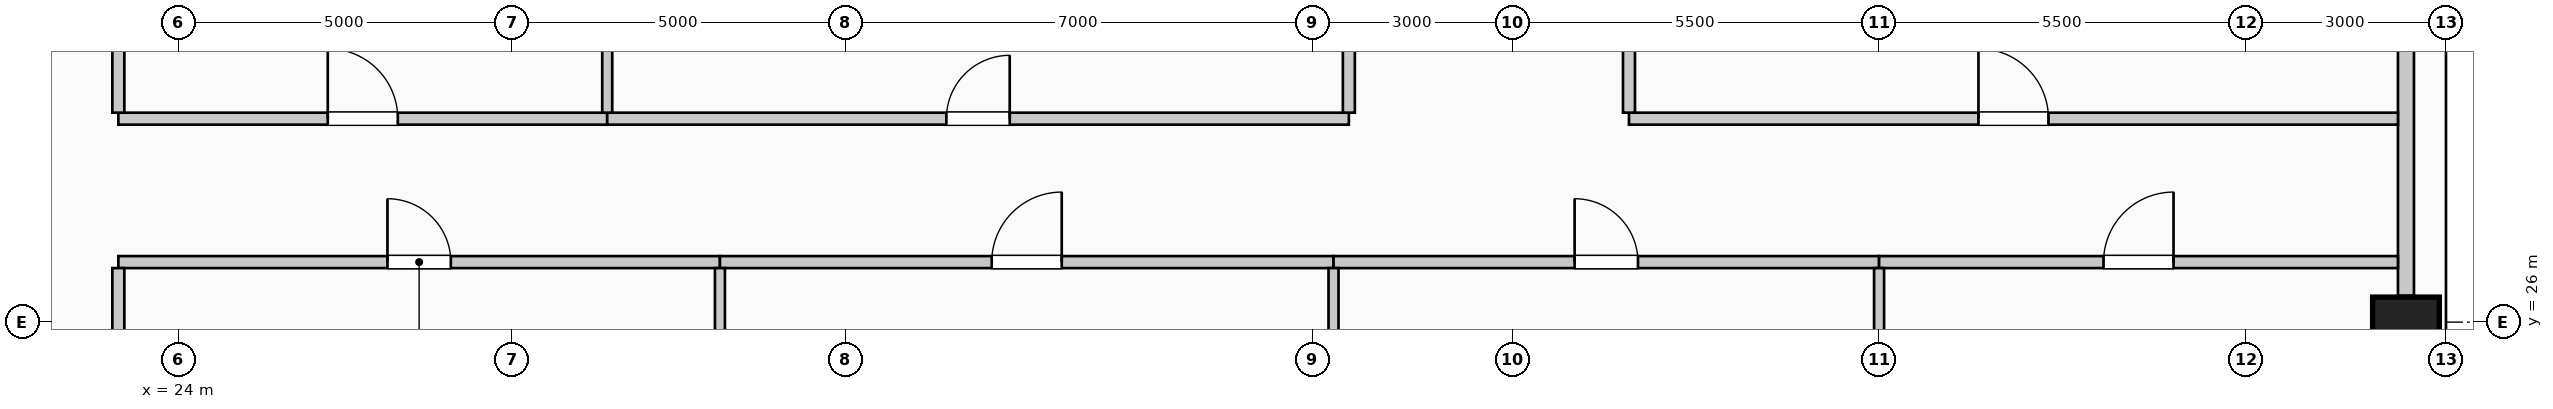
"""IFC4 building model, lengths in metres.
Left out: names, types, materials, properties, quantities, classifications, styles, units other than length and angle.
Written with IfcOpenShell. Run it as: python <this file> out.ifc"""

import sys

from ifc_helpers import new_model, si_unit, direction, frame, frame_2d, origin, origin_2d, place, context, subcontext, project, spatial, rectangle, extrude, element, fill, save


model = new_model("IFC4")
c1 = context("Model", 3, precision=1e-05, world=origin(), true_north=direction((0.0, 1.0)))
c2 = subcontext(c1, "Body", "Model", "MODEL_VIEW")
j1 = project(units=[si_unit("LENGTHUNIT", "METRE"), si_unit("PLANEANGLEUNIT", "RADIAN")], contexts=[c1])
p1 = place(None, origin())
s1 = spatial("IfcSite", under=j1, at=p1, CompositionType="ELEMENT")
p2 = place(p1, origin())
s2 = spatial("IfcBuilding", under=s1, at=p2, CompositionType="ELEMENT")
p3 = place(p2, frame((0.0, 0.0, 248.6)))
s3 = spatial("IfcBuildingStorey", under=s2, at=p3, CompositionType="ELEMENT", Elevation=248.6)
p4 = place(p3, frame((57.4, 26.0, 0.0), z_axis=(0.0, 0.0, 1.0), x_axis=(0.0, 1.0, 0.0)))
e1 = element("IfcColumn", 1, at=p4, inside=s3, PredefinedType="COLUMN", context=c2, shape_type="SweptSolid", body=[
    extrude(rectangle(XDim=0.75, YDim=1.0, at=origin_2d()), origin(), (0.0, 0.0, 1.0), 4.0),
])
p5 = place(p3, frame((57.4, 33.605, 0.0), z_axis=(0.0, 0.0, 1.0), x_axis=(0.0, -1.0, 0.0)))
e2 = element("IfcWall", 2, at=p5, inside=s3, PredefinedType="SOLIDWALL", context=c2, shape_type="SweptSolid", body=[
    extrude(rectangle(XDim=7.21, YDim=0.24, at=frame_2d((3.605, 0.0))), origin(), (0.0, 0.0, 1.0), 3.0),
])
p6 = place(p3, frame((23.1, 26.9, 0.0), z_axis=(0.0, 0.0, 1.0), x_axis=(1.0, 0.0, 0.0)))
e3 = element("IfcWall", 3, at=p6, inside=s3, PredefinedType="PARTITIONING", context=c2, shape_type="SweptSolid", body=[
    extrude(rectangle(XDim=9.02, YDim=0.18, at=frame_2d((4.51, 0.0))), origin(), (0.0, 0.0, 1.0), 3.75),
])
p7 = place(p6, frame((4.035, 0.0, 0.0)))
e4 = element("IfcOpeningElement", 4, at=p7, cuts=e3, PredefinedType="OPENING", context=c2, shape_type="SweptSolid", body=[
    extrude(rectangle(XDim=0.95, YDim=2.15, at=frame_2d((0.475, 1.075))), frame((0.0, 0.1, 0.0), z_axis=(0.0, -1.0, 0.0), x_axis=(1.0, 0.0, 0.0)), (0.0, 0.0, 1.0), 0.2),
])
p8 = place(p3, frame((32.12, 26.9, 0.0), z_axis=(0.0, 0.0, 1.0), x_axis=(1.0, 0.0, 0.0)))
e5 = element("IfcWall", 5, at=p8, inside=s3, PredefinedType="PARTITIONING", context=c2, shape_type="SweptSolid", body=[
    extrude(rectangle(XDim=9.2, YDim=0.18, at=frame_2d((4.6, 0.0))), origin(), (0.0, 0.0, 1.0), 3.75),
])
p9 = place(p8, frame((4.075, 0.0, 0.0)))
e6 = element("IfcOpeningElement", 6, at=p9, cuts=e5, PredefinedType="OPENING", context=c2, shape_type="SweptSolid", body=[
    extrude(rectangle(XDim=1.05, YDim=2.15, at=frame_2d((0.525, 1.075))), frame((0.0, 0.1, 0.0), z_axis=(0.0, -1.0, 0.0), x_axis=(1.0, 0.0, 0.0)), (0.0, 0.0, 1.0), 0.2),
])
p10 = place(p3, frame((41.32, 26.9, 0.0), z_axis=(0.0, 0.0, 1.0), x_axis=(1.0, 0.0, 0.0)))
e7 = element("IfcWall", 7, at=p10, inside=s3, PredefinedType="PARTITIONING", context=c2, shape_type="SweptSolid", body=[
    extrude(rectangle(XDim=8.18, YDim=0.18, at=frame_2d((4.09, 0.0))), origin(), (0.0, 0.0, 1.0), 3.75),
])
p11 = place(p10, frame((3.615, 0.0, 0.0)))
e8 = element("IfcOpeningElement", 8, at=p11, cuts=e7, PredefinedType="OPENING", context=c2, shape_type="SweptSolid", body=[
    extrude(rectangle(XDim=0.95, YDim=2.15, at=frame_2d((0.475, 1.075))), frame((0.0, 0.1, 0.0), z_axis=(0.0, -1.0, 0.0), x_axis=(1.0, 0.0, 0.0)), (0.0, 0.0, 1.0), 0.2),
])
p12 = place(p3, frame((49.5, 26.9, 0.0), z_axis=(0.0, 0.0, 1.0), x_axis=(1.0, 0.0, 0.0)))
e9 = element("IfcWall", 9, at=p12, inside=s3, PredefinedType="PARTITIONING", context=c2, shape_type="SweptSolid", body=[
    extrude(rectangle(XDim=7.78, YDim=0.18, at=frame_2d((3.89, 0.0))), origin(), (0.0, 0.0, 1.0), 3.75),
])
p13 = place(p12, frame((3.365, 0.0, 0.0)))
e10 = element("IfcOpeningElement", 10, at=p13, cuts=e9, PredefinedType="OPENING", context=c2, shape_type="SweptSolid", body=[
    extrude(rectangle(XDim=1.05, YDim=2.15, at=frame_2d((0.525, 1.075))), frame((0.0, 0.1, 0.0), z_axis=(0.0, -1.0, 0.0), x_axis=(1.0, 0.0, 0.0)), (0.0, 0.0, 1.0), 0.2),
])
p14 = place(p3, frame((23.1, 29.05, 0.0), z_axis=(0.0, 0.0, 1.0), x_axis=(1.0, 0.0, 0.0)))
e11 = element("IfcWall", 11, at=p14, inside=s3, PredefinedType="PARTITIONING", context=c2, shape_type="SweptSolid", body=[
    extrude(rectangle(XDim=7.33, YDim=0.18, at=frame_2d((3.665, 0.0))), origin(), (0.0, 0.0, 1.0), 3.75),
])
p15 = place(p14, frame((3.14, 0.0, 0.0)))
e12 = element("IfcOpeningElement", 12, at=p15, cuts=e11, PredefinedType="OPENING", context=c2, shape_type="SweptSolid", body=[
    extrude(rectangle(XDim=1.05, YDim=2.15, at=frame_2d((0.525, 1.075))), frame((0.0, 0.1, 0.0), z_axis=(0.0, -1.0, 0.0), x_axis=(1.0, 0.0, 0.0)), (0.0, 0.0, 1.0), 0.2),
])
p16 = place(p3, frame((30.43, 29.05, 0.0), z_axis=(0.0, 0.0, 1.0), x_axis=(1.0, 0.0, 0.0)))
e13 = element("IfcWall", 13, at=p16, inside=s3, PredefinedType="PARTITIONING", context=c2, shape_type="SweptSolid", body=[
    extrude(rectangle(XDim=11.12, YDim=0.18, at=frame_2d((5.56, 0.0))), origin(), (0.0, 0.0, 1.0), 3.75),
])
p17 = place(p16, frame((5.085, 0.0, 0.0)))
e14 = element("IfcOpeningElement", 14, at=p17, cuts=e13, PredefinedType="OPENING", context=c2, shape_type="SweptSolid", body=[
    extrude(rectangle(XDim=0.95, YDim=2.15, at=frame_2d((0.475, 1.075))), frame((0.0, 0.1, 0.0), z_axis=(0.0, -1.0, 0.0), x_axis=(1.0, 0.0, 0.0)), (0.0, 0.0, 1.0), 0.2),
])
p18 = place(p3, frame((45.75, 29.05, 0.0), z_axis=(0.0, 0.0, 1.0), x_axis=(1.0, 0.0, 0.0)))
e15 = element("IfcWall", 15, at=p18, inside=s3, PredefinedType="PARTITIONING", context=c2, shape_type="SweptSolid", body=[
    extrude(rectangle(XDim=11.53, YDim=0.18, at=frame_2d((5.765, 0.0))), origin(), (0.0, 0.0, 1.0), 3.75),
])
p19 = place(p18, frame((5.24, 0.0, 0.0)))
e16 = element("IfcOpeningElement", 16, at=p19, cuts=e15, PredefinedType="OPENING", context=c2, shape_type="SweptSolid", body=[
    extrude(rectangle(XDim=1.05, YDim=2.15, at=frame_2d((0.525, 1.075))), frame((0.0, 0.1, 0.0), z_axis=(0.0, -1.0, 0.0), x_axis=(1.0, 0.0, 0.0)), (0.0, 0.0, 1.0), 0.2),
])
p20 = place(p3, frame((23.1, 17.3, 0.0), z_axis=(0.0, 0.0, 1.0), x_axis=(0.0, 1.0, 0.0)))
e17 = element("IfcWall", 17, at=p20, inside=s3, PredefinedType="PARTITIONING", context=c2, shape_type="SweptSolid", body=[
    extrude(rectangle(XDim=9.51, YDim=0.18, at=frame_2d((4.755, 0.0))), origin(), (0.0, 0.0, 1.0), 3.75),
])
p21 = place(p3, frame((23.1, 29.14, 0.0), z_axis=(0.0, 0.0, 1.0), x_axis=(0.0, 1.0, 0.0)))
e18 = element("IfcWall", 18, at=p21, inside=s3, PredefinedType="PARTITIONING", context=c2, shape_type="SweptSolid", body=[
    extrude(rectangle(XDim=3.12, YDim=0.18, at=frame_2d((1.56, 0.0))), origin(), (0.0, 0.0, 1.0), 3.75),
])
p22 = place(p3, frame((30.43, 29.14, 0.0), z_axis=(0.0, 0.0, 1.0), x_axis=(0.0, 1.0, 0.0)))
e19 = element("IfcWall", 19, at=p22, inside=s3, PredefinedType="PARTITIONING", context=c2, shape_type="SweptSolid", body=[
    extrude(rectangle(XDim=16.14, YDim=0.15, at=frame_2d((8.07, 0.0))), origin(), (0.0, 0.0, 1.0), 3.75),
])
p23 = place(p3, frame((32.12, 0.72, 0.0), z_axis=(0.0, 0.0, 1.0), x_axis=(0.0, 1.0, 0.0)))
e20 = element("IfcWall", 20, at=p23, inside=s3, PredefinedType="PARTITIONING", context=c2, shape_type="SweptSolid", body=[
    extrude(rectangle(XDim=26.09, YDim=0.15, at=frame_2d((13.045, 0.0))), origin(), (0.0, 0.0, 1.0), 3.75),
])
p24 = place(p3, frame((41.32, 18.425, 0.0), z_axis=(0.0, 0.0, 1.0), x_axis=(0.0, 1.0, 0.0)))
e21 = element("IfcWall", 21, at=p24, inside=s3, PredefinedType="PARTITIONING", context=c2, shape_type="SweptSolid", body=[
    extrude(rectangle(XDim=8.385, YDim=0.15, at=frame_2d((4.192, 0.0))), origin(), (0.0, 0.0, 1.0), 3.195),
])
p25 = place(p3, frame((41.55, 29.14, 0.0), z_axis=(0.0, 0.0, 1.0), x_axis=(0.0, 1.0, 0.0)))
e22 = element("IfcWall", 22, at=p25, inside=s3, PredefinedType="PARTITIONING", context=c2, shape_type="SweptSolid", body=[
    extrude(rectangle(XDim=3.21, YDim=0.18, at=frame_2d((1.605, 0.0))), origin(), (0.0, 0.0, 1.0), 3.195),
])
p26 = place(p3, frame((45.75, 29.14, 0.0), z_axis=(0.0, 0.0, 1.0), x_axis=(0.0, 1.0, 0.0)))
e23 = element("IfcWall", 23, at=p26, inside=s3, PredefinedType="PARTITIONING", context=c2, shape_type="SweptSolid", body=[
    extrude(rectangle(XDim=3.135, YDim=0.18, at=frame_2d((1.567, 0.0))), origin(), (0.0, 0.0, 1.0), 3.75),
])
p27 = place(p3, frame((49.5, 1.1, 0.0), z_axis=(0.0, 0.0, 1.0), x_axis=(0.0, 1.0, 0.0)))
e24 = element("IfcWall", 24, at=p27, inside=s3, PredefinedType="PARTITIONING", context=c2, shape_type="SweptSolid", body=[
    extrude(rectangle(XDim=25.71, YDim=0.15, at=frame_2d((12.855, 0.0))), origin(), (0.0, 0.0, 1.0), 3.75),
])
p28 = place(p7, origin())
e25 = element("IfcDoor", 25, at=p28, inside=s3, OperationType="SINGLE_SWING_LEFT", PredefinedType="DOOR", context=c2, shape_type="SweptSolid", body=[
    extrude(rectangle(XDim=0.95, YDim=2.15, at=frame_2d((0.475, 1.075))), frame((0.0, 0.025, 0.0), z_axis=(0.0, -1.0, 0.0), x_axis=(1.0, 0.0, 0.0)), (0.0, 0.0, 1.0), 0.05),
])
fill(e4, e25)
p29 = place(p9, origin())
e26 = element("IfcDoor", 26, at=p29, inside=s3, OperationType="SINGLE_SWING_RIGHT", PredefinedType="DOOR", context=c2, shape_type="SweptSolid", body=[
    extrude(rectangle(XDim=1.05, YDim=2.15, at=frame_2d((0.525, 1.075))), frame((0.0, 0.025, 0.0), z_axis=(0.0, -1.0, 0.0), x_axis=(1.0, 0.0, 0.0)), (0.0, 0.0, 1.0), 0.05),
])
fill(e6, e26)
p30 = place(p11, origin())
e27 = element("IfcDoor", 27, at=p30, inside=s3, OperationType="SINGLE_SWING_LEFT", PredefinedType="DOOR", context=c2, shape_type="SweptSolid", body=[
    extrude(rectangle(XDim=0.95, YDim=2.15, at=frame_2d((0.475, 1.075))), frame((0.0, 0.025, 0.0), z_axis=(0.0, -1.0, 0.0), x_axis=(1.0, 0.0, 0.0)), (0.0, 0.0, 1.0), 0.05),
])
fill(e8, e27)
p31 = place(p13, origin())
e28 = element("IfcDoor", 28, at=p31, inside=s3, OperationType="SINGLE_SWING_RIGHT", PredefinedType="DOOR", context=c2, shape_type="SweptSolid", body=[
    extrude(rectangle(XDim=1.05, YDim=2.15, at=frame_2d((0.525, 1.075))), frame((0.0, 0.025, 0.0), z_axis=(0.0, -1.0, 0.0), x_axis=(1.0, 0.0, 0.0)), (0.0, 0.0, 1.0), 0.05),
])
fill(e10, e28)
p32 = place(p15, origin())
e29 = element("IfcDoor", 29, at=p32, inside=s3, OperationType="SINGLE_SWING_LEFT", PredefinedType="DOOR", context=c2, shape_type="SweptSolid", body=[
    extrude(rectangle(XDim=1.05, YDim=2.15, at=frame_2d((0.525, 1.075))), frame((0.0, 0.025, 0.0), z_axis=(0.0, -1.0, 0.0), x_axis=(1.0, 0.0, 0.0)), (0.0, 0.0, 1.0), 0.05),
])
fill(e12, e29)
p33 = place(p17, origin())
e30 = element("IfcDoor", 30, at=p33, inside=s3, OperationType="SINGLE_SWING_RIGHT", PredefinedType="DOOR", context=c2, shape_type="SweptSolid", body=[
    extrude(rectangle(XDim=0.95, YDim=2.15, at=frame_2d((0.475, 1.075))), frame((0.0, 0.025, 0.0), z_axis=(0.0, -1.0, 0.0), x_axis=(1.0, 0.0, 0.0)), (0.0, 0.0, 1.0), 0.05),
])
fill(e14, e30)
p34 = place(p19, origin())
e31 = element("IfcDoor", 31, at=p34, inside=s3, OperationType="SINGLE_SWING_LEFT", PredefinedType="DOOR", context=c2, shape_type="SweptSolid", body=[
    extrude(rectangle(XDim=1.05, YDim=2.15, at=frame_2d((0.525, 1.075))), frame((0.0, 0.025, 0.0), z_axis=(0.0, -1.0, 0.0), x_axis=(1.0, 0.0, 0.0)), (0.0, 0.0, 1.0), 0.05),
])
fill(e16, e31)
save(model, sys.argv[1])
